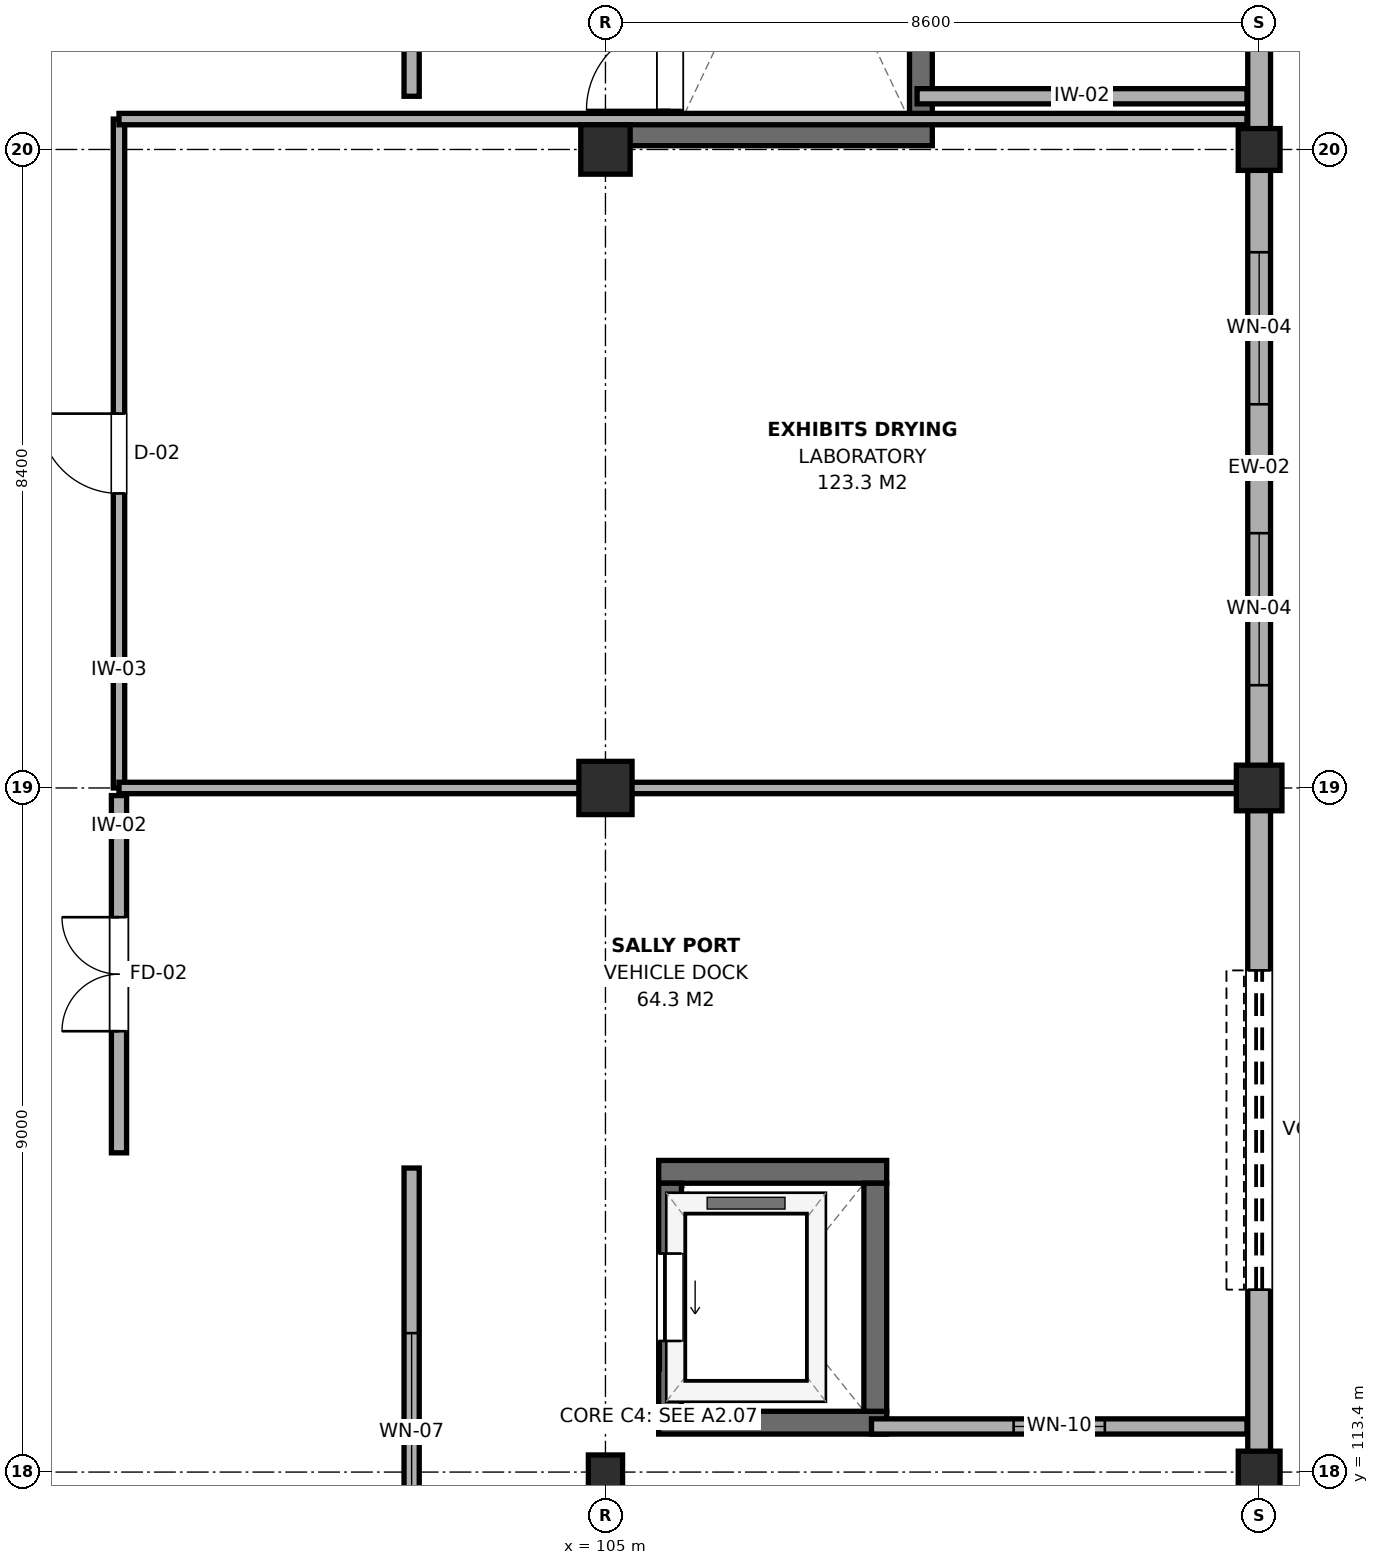
"""IFC4 building model, lengths in metres.
Left out: names, types, materials, properties, quantities, classifications, styles, units other than length and angle.
Written with IfcOpenShell. Run it as: python <this file> out.ifc"""

import sys

from ifc_helpers import new_model, si_unit, direction, frame, frame_2d, origin, origin_2d, place, context, subcontext, project, spatial, rectangle, extrude, element, fill, save


model = new_model("IFC4")
c1 = context("Model", 3, precision=1e-05, world=origin(), true_north=direction((0.0, 1.0)))
c2 = subcontext(c1, "Body", "Model", "MODEL_VIEW")
j1 = project(units=[si_unit("LENGTHUNIT", "METRE"), si_unit("PLANEANGLEUNIT", "RADIAN")], contexts=[c1])
p1 = place(None, origin())
s1 = spatial("IfcSite", under=j1, at=p1, CompositionType="ELEMENT")
p2 = place(p1, origin())
s2 = spatial("IfcBuilding", under=s1, at=p2, CompositionType="ELEMENT")
p3 = place(p2, origin())
s3 = spatial("IfcBuildingStorey", under=s2, at=p3, CompositionType="ELEMENT", Elevation=0.0)
p4 = place(p3, frame((105.0, 113.4, 0.0), z_axis=(0.0, 0.0, 1.0), x_axis=(1.0, 0.0, 0.0)))
e1 = element("IfcColumn", 1, at=p4, inside=s3, PredefinedType="COLUMN", context=c2, shape_type="SweptSolid", body=[
    extrude(rectangle(XDim=0.45, YDim=0.45, at=origin_2d()), origin(), (0.0, 0.0, 1.0), 4.8),
])
p5 = place(p3, frame((105.0, 122.4, 0.0), z_axis=(0.0, 0.0, 1.0), x_axis=(1.0, 0.0, 0.0)))
e2 = element("IfcColumn", 2, at=p5, inside=s3, PredefinedType="COLUMN", context=c2, shape_type="SweptSolid", body=[
    extrude(rectangle(XDim=0.7, YDim=0.7, at=origin_2d()), origin(), (0.0, 0.0, 1.0), 4.8),
])
p6 = place(p3, frame((105.0, 130.8, 0.0), z_axis=(0.0, 0.0, 1.0), x_axis=(1.0, 0.0, 0.0)))
e3 = element("IfcColumn", 3, at=p6, inside=s3, PredefinedType="COLUMN", context=c2, shape_type="SweptSolid", body=[
    extrude(rectangle(XDim=0.65, YDim=0.65, at=origin_2d()), origin(), (0.0, 0.0, 1.0), 4.8),
])
p7 = place(p3, frame((113.6, 113.4, 0.0), z_axis=(0.0, 0.0, 1.0), x_axis=(1.0, 0.0, 0.0)))
e4 = element("IfcColumn", 4, at=p7, inside=s3, PredefinedType="COLUMN", context=c2, shape_type="SweptSolid", body=[
    extrude(rectangle(XDim=0.55, YDim=0.55, at=origin_2d()), origin(), (0.0, 0.0, 1.0), 4.8),
])
p8 = place(p3, frame((113.6, 122.4, 0.0), z_axis=(0.0, 0.0, 1.0), x_axis=(1.0, 0.0, 0.0)))
e5 = element("IfcColumn", 5, at=p8, inside=s3, PredefinedType="COLUMN", context=c2, shape_type="SweptSolid", body=[
    extrude(rectangle(XDim=0.6, YDim=0.6, at=origin_2d()), origin(), (0.0, 0.0, 1.0), 4.8),
])
p9 = place(p3, frame((113.6, 130.8, 0.0), z_axis=(0.0, 0.0, 1.0), x_axis=(1.0, 0.0, 0.0)))
e6 = element("IfcColumn", 6, at=p9, inside=s3, PredefinedType="COLUMN", context=c2, shape_type="SweptSolid", body=[
    extrude(rectangle(XDim=0.55, YDim=0.55, at=origin_2d()), origin(), (0.0, 0.0, 1.0), 4.8),
])
p10 = place(p3, frame((105.15, 131.0, 0.0), z_axis=(0.0, 0.0, 1.0), x_axis=(1.0, 0.0, 0.0)))
e7 = element("IfcWall", 7, at=p10, inside=s3, PredefinedType="SHEAR", context=c2, shape_type="SweptSolid", body=[
    extrude(rectangle(XDim=4.15, YDim=0.3, at=frame_2d((2.075, 0.0))), origin(), (0.0, 0.0, 1.0), 4.56),
])
p11 = place(p3, frame((105.85, 131.15, 0.0), z_axis=(0.0, 0.0, 1.0), x_axis=(0.0, 1.0, 0.0)))
e8 = element("IfcWall", 8, at=p11, inside=s3, PredefinedType="SHEAR", context=c2, shape_type="SweptSolid", body=[
    extrude(rectangle(XDim=6.4, YDim=0.3, at=frame_2d((3.2, 0.0))), origin(), (0.0, 0.0, 1.0), 4.56),
])
p12 = place(p11, frame((0.17, 0.0, 0.0)))
e9 = element("IfcOpeningElement", 9, at=p12, cuts=e8, PredefinedType="OPENING", context=c2, shape_type="SweptSolid", body=[
    extrude(rectangle(XDim=1.1, YDim=2.15, at=frame_2d((0.55, 1.075))), frame((0.0, 0.165, 0.0), z_axis=(0.0, -1.0, 0.0), x_axis=(1.0, 0.0, 0.0)), (0.0, 0.0, 1.0), 0.33),
])
p13 = place(p3, frame((109.15, 131.15, 0.0), z_axis=(0.0, 0.0, 1.0), x_axis=(0.0, 1.0, 0.0)))
e10 = element("IfcWall", 10, at=p13, inside=s3, PredefinedType="SHEAR", context=c2, shape_type="SweptSolid", body=[
    extrude(rectangle(XDim=6.4, YDim=0.3, at=frame_2d((3.2, 0.0))), origin(), (0.0, 0.0, 1.0), 4.56),
])
for number, where, z_axis, x_axis in (
    (11, (105.7, 114.05, 0.0), (0.0, 0.0, 1.0), (1.0, 0.0, 0.0)),
    (12, (105.7, 117.35, 0.0), (0.0, 0.0, 1.0), (1.0, 0.0, 0.0)),
):
    element("IfcWall", number, at=place(p3, frame(where, z_axis=z_axis, x_axis=x_axis)), inside=s3, PredefinedType="SHEAR", context=c2, shape_type="SweptSolid", body=[
        extrude(rectangle(XDim=3.0, YDim=0.3, at=frame_2d((1.5, 0.0))), origin(), (0.0, 0.0, 1.0), 4.56),
    ])
p14 = place(p3, frame((105.85, 114.2, 0.0), z_axis=(0.0, 0.0, 1.0), x_axis=(0.0, 1.0, 0.0)))
e13 = element("IfcWall", 13, at=p14, inside=s3, PredefinedType="SHEAR", context=c2, shape_type="SweptSolid", body=[
    extrude(rectangle(XDim=3.0, YDim=0.3, at=frame_2d((1.5, 0.0))), origin(), (0.0, 0.0, 1.0), 4.56),
])
p15 = place(p14, frame((0.925, 0.0, 0.0)))
e14 = element("IfcOpeningElement", 14, at=p15, cuts=e13, PredefinedType="OPENING", context=c2, shape_type="SweptSolid", body=[
    extrude(rectangle(XDim=1.15, YDim=2.15, at=frame_2d((0.575, 1.075))), frame((0.0, 0.165, 0.0), z_axis=(0.0, -1.0, 0.0), x_axis=(1.0, 0.0, 0.0)), (0.0, 0.0, 1.0), 0.33),
])
p16 = place(p3, frame((108.55, 114.2, 0.0), z_axis=(0.0, 0.0, 1.0), x_axis=(0.0, 1.0, 0.0)))
e15 = element("IfcWall", 15, at=p16, inside=s3, PredefinedType="SHEAR", context=c2, shape_type="SweptSolid", body=[
    extrude(rectangle(XDim=3.0, YDim=0.3, at=frame_2d((1.5, 0.0))), origin(), (0.0, 0.0, 1.0), 4.56),
])
p17 = place(p3, frame((113.6, 104.4, 0.0), z_axis=(0.0, 0.0, 1.0), x_axis=(0.0, 1.0, 0.0)))
e16 = element("IfcWall", 16, at=p17, inside=s3, PredefinedType="SOLIDWALL", context=c2, shape_type="SweptSolid", body=[
    extrude(rectangle(XDim=9.0, YDim=0.3, at=frame_2d((4.5, 0.0))), origin(), (0.0, 0.0, 1.0), 4.115),
])
p18 = place(p17, frame((7.35, 0.0, 0.0)))
e17 = element("IfcOpeningElement", 17, at=p18, cuts=e16, PredefinedType="OPENING", context=c2, shape_type="SweptSolid", body=[
    extrude(rectangle(XDim=1.1, YDim=2.2, at=frame_2d((0.55, 1.1))), frame((0.0, 0.165, 0.0), z_axis=(0.0, -1.0, 0.0), x_axis=(1.0, 0.0, 0.0)), (0.0, 0.0, 1.0), 0.33),
])
p19 = place(p3, frame((113.6, 113.4, 0.0), z_axis=(0.0, 0.0, 1.0), x_axis=(0.0, 1.0, 0.0)))
e18 = element("IfcWall", 18, at=p19, inside=s3, PredefinedType="SOLIDWALL", context=c2, shape_type="SweptSolid", body=[
    extrude(rectangle(XDim=9.0, YDim=0.3, at=frame_2d((4.5, 0.0))), origin(), (0.0, 0.0, 1.0), 3.965),
])
p20 = place(p19, frame((2.4, 0.0, 0.0)))
e19 = element("IfcOpeningElement", 19, at=p20, cuts=e18, PredefinedType="OPENING", context=c2, shape_type="SweptSolid", body=[
    extrude(rectangle(XDim=4.2, YDim=3.2, at=frame_2d((2.1, 1.6))), frame((0.0, 0.165, 0.0), z_axis=(0.0, -1.0, 0.0), x_axis=(1.0, 0.0, 0.0)), (0.0, 0.0, 1.0), 0.33),
])
p21 = place(p3, frame((113.6, 122.4, 0.0), z_axis=(0.0, 0.0, 1.0), x_axis=(0.0, 1.0, 0.0)))
e20 = element("IfcWall", 20, at=p21, inside=s3, PredefinedType="SOLIDWALL", context=c2, shape_type="SweptSolid", body=[
    extrude(rectangle(XDim=8.4, YDim=0.3, at=frame_2d((4.2, 0.0))), origin(), (0.0, 0.0, 1.0), 3.965),
])
p22 = place(p21, frame((1.352, 0.0, 1.1)))
e21 = element("IfcOpeningElement", 21, at=p22, cuts=e20, PredefinedType="OPENING", context=c2, shape_type="SweptSolid", body=[
    extrude(rectangle(XDim=2.0, YDim=1.8, at=frame_2d((1.0, 0.9))), frame((0.0, 0.165, 0.0), z_axis=(0.0, -1.0, 0.0), x_axis=(1.0, 0.0, 0.0)), (0.0, 0.0, 1.0), 0.33),
])
p23 = place(p21, frame((5.048, 0.0, 1.1)))
e22 = element("IfcOpeningElement", 22, at=p23, cuts=e20, PredefinedType="OPENING", context=c2, shape_type="SweptSolid", body=[
    extrude(rectangle(XDim=2.0, YDim=1.8, at=frame_2d((1.0, 0.9))), frame((0.0, 0.165, 0.0), z_axis=(0.0, -1.0, 0.0), x_axis=(1.0, 0.0, 0.0)), (0.0, 0.0, 1.0), 0.33),
])
p24 = place(p3, frame((113.6, 130.8, 0.0), z_axis=(0.0, 0.0, 1.0), x_axis=(0.0, 1.0, 0.0)))
e23 = element("IfcWall", 23, at=p24, inside=s3, PredefinedType="SOLIDWALL", context=c2, shape_type="SweptSolid", body=[
    extrude(rectangle(XDim=7.2, YDim=0.3, at=frame_2d((3.6, 0.0))), origin(), (0.0, 0.0, 1.0), 3.965),
])
p25 = place(p24, frame((2.6, 0.0, 0.0)))
e24 = element("IfcOpeningElement", 24, at=p25, cuts=e23, PredefinedType="OPENING", context=c2, shape_type="SweptSolid", body=[
    extrude(rectangle(XDim=2.0, YDim=2.25, at=frame_2d((1.0, 1.125))), frame((0.0, 0.165, 0.0), z_axis=(0.0, -1.0, 0.0), x_axis=(1.0, 0.0, 0.0)), (0.0, 0.0, 1.0), 0.33),
])
p26 = place(p3, frame((102.45, 131.5, 0.0), z_axis=(0.0, 0.0, 1.0), x_axis=(0.0, 1.0, 0.0)))
e25 = element("IfcWall", 25, at=p26, inside=s3, PredefinedType="PARTITIONING", context=c2, shape_type="SweptSolid", body=[
    extrude(rectangle(XDim=10.3, YDim=0.2, at=frame_2d((5.15, 0.0))), origin(), (0.0, 0.0, 1.0), 4.205),
])
p27 = place(p26, frame((2.65, 0.0, 0.0)))
e26 = element("IfcOpeningElement", 26, at=p27, cuts=e25, PredefinedType="OPENING", context=c2, shape_type="SweptSolid", body=[
    extrude(rectangle(XDim=1.1, YDim=2.15, at=frame_2d((0.55, 1.075))), frame((0.0, 0.115, 0.0), z_axis=(0.0, -1.0, 0.0), x_axis=(1.0, 0.0, 0.0)), (0.0, 0.0, 1.0), 0.23),
])
p28 = place(p26, frame((6.116, 0.0, 0.95)))
e27 = element("IfcOpeningElement", 27, at=p28, cuts=e25, PredefinedType="OPENING", context=c2, shape_type="SweptSolid", body=[
    extrude(rectangle(XDim=2.6, YDim=1.5, at=frame_2d((1.3, 0.75))), frame((0.0, 0.115, 0.0), z_axis=(0.0, -1.0, 0.0), x_axis=(1.0, 0.0, 0.0)), (0.0, 0.0, 1.0), 0.23),
])
p29 = place(p3, frame((109.1, 131.5, 0.0), z_axis=(0.0, 0.0, 1.0), x_axis=(1.0, 0.0, 0.0)))
e28 = element("IfcWall", 28, at=p29, inside=s3, PredefinedType="PARTITIONING", context=c2, shape_type="SweptSolid", body=[
    extrude(rectangle(XDim=4.34, YDim=0.2, at=frame_2d((2.17, 0.0))), origin(), (0.0, 0.0, 1.0), 4.225),
])
p30 = place(p3, frame((102.45, 105.0, 0.0), z_axis=(0.0, 0.0, 1.0), x_axis=(0.0, 1.0, 0.0)))
e29 = element("IfcWall", 29, at=p30, inside=s3, PredefinedType="PARTITIONING", context=c2, shape_type="SweptSolid", body=[
    extrude(rectangle(XDim=12.4, YDim=0.2, at=frame_2d((6.2, 0.0))), origin(), (0.0, 0.0, 1.0), 4.165),
])
p31 = place(p30, frame((2.65, 0.0, 0.0)))
e30 = element("IfcOpeningElement", 30, at=p31, cuts=e29, PredefinedType="OPENING", context=c2, shape_type="SweptSolid", body=[
    extrude(rectangle(XDim=1.1, YDim=2.15, at=frame_2d((0.55, 1.075))), frame((0.0, 0.115, 0.0), z_axis=(0.0, -1.0, 0.0), x_axis=(1.0, 0.0, 0.0)), (0.0, 0.0, 1.0), 0.23),
])
p32 = place(p30, frame((7.628, 0.0, 0.95)))
e31 = element("IfcOpeningElement", 31, at=p32, cuts=e29, PredefinedType="OPENING", context=c2, shape_type="SweptSolid", body=[
    extrude(rectangle(XDim=2.6, YDim=1.5, at=frame_2d((1.3, 0.75))), frame((0.0, 0.115, 0.0), z_axis=(0.0, -1.0, 0.0), x_axis=(1.0, 0.0, 0.0)), (0.0, 0.0, 1.0), 0.23),
])
p33 = place(p3, frame((108.5, 114.0, 0.0), z_axis=(0.0, 0.0, 1.0), x_axis=(1.0, 0.0, 0.0)))
e32 = element("IfcWall", 32, at=p33, inside=s3, PredefinedType="PARTITIONING", context=c2, shape_type="SweptSolid", body=[
    extrude(rectangle(XDim=4.94, YDim=0.2, at=frame_2d((2.47, 0.0))), origin(), (0.0, 0.0, 1.0), 4.205),
])
p34 = place(p33, frame((1.87, 0.0, 0.95)))
e33 = element("IfcOpeningElement", 33, at=p34, cuts=e32, PredefinedType="OPENING", context=c2, shape_type="SweptSolid", body=[
    extrude(rectangle(XDim=1.2, YDim=1.5, at=frame_2d((0.6, 0.75))), frame((0.0, 0.115, 0.0), z_axis=(0.0, -1.0, 0.0), x_axis=(1.0, 0.0, 0.0)), (0.0, 0.0, 1.0), 0.23),
])
p35 = place(p3, frame((98.6, 117.6, 0.0), z_axis=(0.0, 0.0, 1.0), x_axis=(0.0, 1.0, 0.0)))
e34 = element("IfcWall", 34, at=p35, inside=s3, PredefinedType="PARTITIONING", context=c2, shape_type="SweptSolid", body=[
    extrude(rectangle(XDim=4.7, YDim=0.2, at=frame_2d((2.35, 0.0))), origin(), (0.0, 0.0, 1.0), 4.205),
])
p36 = place(p35, frame((1.6, 0.0, 0.0)))
e35 = element("IfcOpeningElement", 35, at=p36, cuts=e34, PredefinedType="OPENING", context=c2, shape_type="SweptSolid", body=[
    extrude(rectangle(XDim=1.5, YDim=2.15, at=frame_2d((0.75, 1.075))), frame((0.0, 0.115, 0.0), z_axis=(0.0, -1.0, 0.0), x_axis=(1.0, 0.0, 0.0)), (0.0, 0.0, 1.0), 0.23),
])
p37 = place(p3, frame((98.6, 122.4, 0.0), z_axis=(0.0, 0.0, 1.0), x_axis=(0.0, 1.0, 0.0)))
e36 = element("IfcWall", 36, at=p37, inside=s3, PredefinedType="PARTITIONING", context=c2, shape_type="SweptSolid", body=[
    extrude(rectangle(XDim=8.8, YDim=0.15, at=frame_2d((4.4, 0.0))), origin(), (0.0, 0.0, 1.0), 3.965),
])
p38 = place(p37, frame((3.875, 0.0, 0.0)))
e37 = element("IfcOpeningElement", 37, at=p38, cuts=e36, PredefinedType="OPENING", context=c2, shape_type="SweptSolid", body=[
    extrude(rectangle(XDim=1.05, YDim=2.15, at=frame_2d((0.525, 1.075))), frame((0.0, 0.09, 0.0), z_axis=(0.0, -1.0, 0.0), x_axis=(1.0, 0.0, 0.0)), (0.0, 0.0, 1.0), 0.18),
])
p39 = place(p3, frame((98.6, 122.4, 0.0), z_axis=(0.0, 0.0, 1.0), x_axis=(1.0, 0.0, 0.0)))
e38 = element("IfcWall", 38, at=p39, inside=s3, PredefinedType="PARTITIONING", context=c2, shape_type="SweptSolid", body=[
    extrude(rectangle(XDim=14.84, YDim=0.15, at=frame_2d((7.42, 0.0))), origin(), (0.0, 0.0, 1.0), 3.965),
])
p40 = place(p3, frame((98.6, 131.2, 0.0), z_axis=(0.0, 0.0, 1.0), x_axis=(1.0, 0.0, 0.0)))
e39 = element("IfcWall", 39, at=p40, inside=s3, PredefinedType="PARTITIONING", context=c2, shape_type="SweptSolid", body=[
    extrude(rectangle(XDim=14.84, YDim=0.15, at=frame_2d((7.42, 0.0))), origin(), (0.0, 0.0, 1.0), 4.055),
])
p41 = place(p20, frame((4.2, 0.0, 0.0), z_axis=(0.0, 0.0, 1.0), x_axis=(-1.0, 0.0, 0.0)))
e40 = element("IfcDoor", 40, at=p41, inside=s3, OperationType="ROLLINGUP", PredefinedType="GATE", context=c2, shape_type="SweptSolid", body=[
    extrude(rectangle(XDim=4.2, YDim=3.2, at=frame_2d((2.1, 1.6))), frame((0.0, 0.025, 0.0), z_axis=(0.0, -1.0, 0.0), x_axis=(1.0, 0.0, 0.0)), (0.0, 0.0, 1.0), 0.05),
])
fill(e19, e40)
p42 = place(p22, origin())
e41 = element("IfcWindow", 41, at=p42, inside=s3, PartitioningType="SINGLE_PANEL", PredefinedType="WINDOW", context=c2, shape_type="SweptSolid", body=[
    extrude(rectangle(XDim=2.0, YDim=1.8, at=frame_2d((1.0, 0.9))), frame((0.0, 0.03, 0.0), z_axis=(0.0, -1.0, 0.0), x_axis=(1.0, 0.0, 0.0)), (0.0, 0.0, 1.0), 0.06),
])
fill(e21, e41)
p43 = place(p23, origin())
e42 = element("IfcWindow", 42, at=p43, inside=s3, PartitioningType="SINGLE_PANEL", PredefinedType="WINDOW", context=c2, shape_type="SweptSolid", body=[
    extrude(rectangle(XDim=2.0, YDim=1.8, at=frame_2d((1.0, 0.9))), frame((0.0, 0.03, 0.0), z_axis=(0.0, -1.0, 0.0), x_axis=(1.0, 0.0, 0.0)), (0.0, 0.0, 1.0), 0.06),
])
fill(e22, e42)
p44 = place(p12, origin())
e43 = element("IfcDoor", 43, at=p44, inside=s3, OperationType="SINGLE_SWING_LEFT", PredefinedType="DOOR", context=c2, shape_type="SweptSolid", body=[
    extrude(rectangle(XDim=1.1, YDim=2.15, at=frame_2d((0.55, 1.075))), frame((0.0, 0.025, 0.0), z_axis=(0.0, -1.0, 0.0), x_axis=(1.0, 0.0, 0.0)), (0.0, 0.0, 1.0), 0.05),
])
fill(e9, e43)
p45 = place(p15, origin())
e44 = element("IfcDoor", 44, at=p45, inside=s3, OperationType="SLIDING_TO_LEFT", PredefinedType="DOOR", context=c2, shape_type="SweptSolid", body=[
    extrude(rectangle(XDim=1.15, YDim=2.15, at=frame_2d((0.575, 1.075))), frame((0.0, 0.025, 0.0), z_axis=(0.0, -1.0, 0.0), x_axis=(1.0, 0.0, 0.0)), (0.0, 0.0, 1.0), 0.05),
])
fill(e14, e44)
p46 = place(p32, origin())
e45 = element("IfcWindow", 45, at=p46, inside=s3, PartitioningType="SINGLE_PANEL", PredefinedType="WINDOW", context=c2, shape_type="SweptSolid", body=[
    extrude(rectangle(XDim=2.6, YDim=1.5, at=frame_2d((1.3, 0.75))), frame((0.0, 0.03, 0.0), z_axis=(0.0, -1.0, 0.0), x_axis=(1.0, 0.0, 0.0)), (0.0, 0.0, 1.0), 0.06),
])
fill(e31, e45)
p47 = place(p34, origin())
e46 = element("IfcWindow", 46, at=p47, inside=s3, PartitioningType="SINGLE_PANEL", PredefinedType="WINDOW", context=c2, shape_type="SweptSolid", body=[
    extrude(rectangle(XDim=1.2, YDim=1.5, at=frame_2d((0.6, 0.75))), frame((0.0, 0.03, 0.0), z_axis=(0.0, -1.0, 0.0), x_axis=(1.0, 0.0, 0.0)), (0.0, 0.0, 1.0), 0.06),
])
fill(e33, e46)
p48 = place(p36, origin())
e47 = element("IfcDoor", 47, at=p48, inside=s3, OperationType="DOUBLE_DOOR_SINGLE_SWING", PredefinedType="DOOR", context=c2, shape_type="SweptSolid", body=[
    extrude(rectangle(XDim=1.5, YDim=2.15, at=frame_2d((0.75, 1.075))), frame((0.0, 0.025, 0.0), z_axis=(0.0, -1.0, 0.0), x_axis=(1.0, 0.0, 0.0)), (0.0, 0.0, 1.0), 0.05),
])
fill(e35, e47)
p49 = place(p38, origin())
e48 = element("IfcDoor", 48, at=p49, inside=s3, OperationType="SINGLE_SWING_RIGHT", PredefinedType="DOOR", context=c2, shape_type="SweptSolid", body=[
    extrude(rectangle(XDim=1.05, YDim=2.15, at=frame_2d((0.525, 1.075))), frame((0.0, 0.025, 0.0), z_axis=(0.0, -1.0, 0.0), x_axis=(1.0, 0.0, 0.0)), (0.0, 0.0, 1.0), 0.05),
])
fill(e37, e48)
save(model, sys.argv[1])
